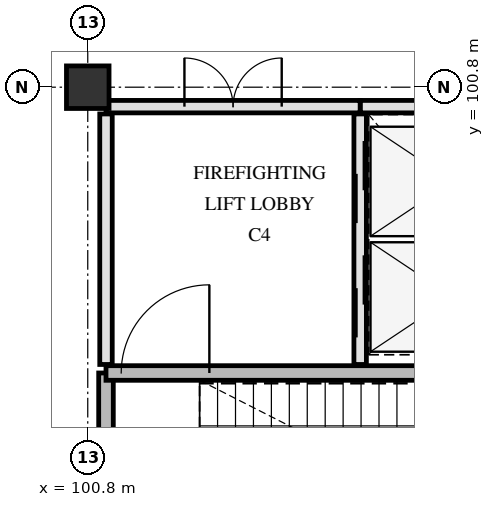
"""IFC4 building model, lengths in metres.
Left out: names, types, materials, properties, quantities, classifications, styles, units other than length and angle.
Written with IfcOpenShell. Run it as: python <this file> out.ifc"""

import sys

from ifc_helpers import new_model, si_unit, direction, frame, frame_2d, origin, origin_2d, place, context, subcontext, project, spatial, rectangle, extrude, element, fill, save


model = new_model("IFC4")
c1 = context("Model", 3, precision=1e-05, world=origin(), true_north=direction((0.0, 1.0)))
c2 = subcontext(c1, "Body", "Model", "MODEL_VIEW")
j1 = project(units=[si_unit("LENGTHUNIT", "METRE"), si_unit("PLANEANGLEUNIT", "RADIAN")], contexts=[c1])
p1 = place(None, origin())
s1 = spatial("IfcSite", under=j1, at=p1, CompositionType="ELEMENT")
p2 = place(p1, origin())
s2 = spatial("IfcBuilding", under=s1, at=p2, CompositionType="ELEMENT")
p3 = place(p2, frame((0.0, 0.0, 9.3)))
s3 = spatial("IfcBuildingStorey", under=s2, at=p3, CompositionType="ELEMENT", Elevation=9.3)
p4 = place(p3, frame((100.8, 100.8, 0.0), z_axis=(0.0, 0.0, 1.0), x_axis=(1.0, 0.0, 0.0)))
e1 = element("IfcColumn", 1, at=p4, inside=s3, PredefinedType="COLUMN", context=c2, shape_type="SweptSolid", body=[
    extrude(rectangle(XDim=0.7, YDim=0.7, at=origin_2d()), origin(), (0.0, 0.0, 1.0), 5.1),
])
p5 = place(p3, frame((101.1, 92.78, 0.0), z_axis=(0.0, 0.0, 1.0), x_axis=(0.0, 1.0, 0.0)))
e2 = element("IfcWall", 2, at=p5, inside=s3, PredefinedType="SHEAR", context=c2, shape_type="SweptSolid", body=[
    extrude(rectangle(XDim=3.32, YDim=0.24, at=frame_2d((1.66, 0.0))), origin(), (0.0, 0.0, 1.0), 4.78),
])
p6 = place(p3, frame((101.1, 96.1, 0.0), z_axis=(0.0, 0.0, 1.0), x_axis=(1.0, 0.0, 0.0)))
e3 = element("IfcWall", 3, at=p6, inside=s3, PredefinedType="SHEAR", context=c2, shape_type="SweptSolid", body=[
    extrude(rectangle(XDim=7.82, YDim=0.24, at=frame_2d((3.91, 0.0))), origin(), (0.0, 0.0, 1.0), 4.78),
])
p7 = place(p6, frame((0.25, 0.0, 0.0)))
e4 = element("IfcOpeningElement", 4, at=p7, cuts=e3, PredefinedType="OPENING", context=c2, shape_type="SweptSolid", body=[
    extrude(rectangle(XDim=1.45, YDim=2.2, at=frame_2d((0.725, 1.1))), frame((0.0, 0.13, 0.0), z_axis=(0.0, -1.0, 0.0), x_axis=(1.0, 0.0, 0.0)), (0.0, 0.0, 1.0), 0.26),
])
p8 = place(p3, frame((105.28, 96.24, 0.0), z_axis=(0.0, 0.0, 1.0), x_axis=(0.0, 1.0, 0.0)))
e5 = element("IfcWall", 5, at=p8, inside=s3, PredefinedType="PARTITIONING", context=c2, shape_type="SweptSolid", body=[
    extrude(rectangle(XDim=4.12, YDim=0.205, at=frame_2d((2.06, 0.0))), origin(), (0.0, 0.0, 1.0), 4.77),
])
p9 = place(p8, frame((0.445, 0.0, 0.0)))
e6 = element("IfcOpeningElement", 6, at=p9, cuts=e5, PredefinedType="OPENING", context=c2, shape_type="SweptSolid", body=[
    extrude(rectangle(XDim=1.35, YDim=2.2, at=frame_2d((0.675, 1.1))), frame((0.0, 0.113, 0.0), z_axis=(0.0, -1.0, 0.0), x_axis=(1.0, 0.0, 0.0)), (0.0, 0.0, 1.0), 0.225),
])
p10 = place(p8, frame((2.325, 0.0, 0.0)))
e7 = element("IfcOpeningElement", 7, at=p10, cuts=e5, PredefinedType="OPENING", context=c2, shape_type="SweptSolid", body=[
    extrude(rectangle(XDim=1.35, YDim=2.2, at=frame_2d((0.675, 1.1))), frame((0.0, 0.113, 0.0), z_axis=(0.0, -1.0, 0.0), x_axis=(1.0, 0.0, 0.0)), (0.0, 0.0, 1.0), 0.225),
])
p11 = place(p3, frame((105.28, 100.48, 0.0), z_axis=(0.0, 0.0, 1.0), x_axis=(1.0, 0.0, 0.0)))
e8 = element("IfcWall", 8, at=p11, inside=s3, PredefinedType="PARTITIONING", context=c2, shape_type="SweptSolid", body=[
    extrude(rectangle(XDim=3.57, YDim=0.205, at=frame_2d((1.785, 0.0))), origin(), (0.0, 0.0, 1.0), 4.17),
])
p12 = place(p3, frame((101.1, 96.24, 0.0), z_axis=(0.0, 0.0, 1.0), x_axis=(0.0, 1.0, 0.0)))
e9 = element("IfcWall", 9, at=p12, inside=s3, PredefinedType="PARTITIONING", context=c2, shape_type="SweptSolid", body=[
    extrude(rectangle(XDim=4.12, YDim=0.205, at=frame_2d((2.06, 0.0))), origin(), (0.0, 0.0, 1.0), 4.17),
])
p13 = place(p3, frame((101.1, 100.48, 0.0), z_axis=(0.0, 0.0, 1.0), x_axis=(1.0, 0.0, 0.0)))
e10 = element("IfcWall", 10, at=p13, inside=s3, PredefinedType="PARTITIONING", context=c2, shape_type="SweptSolid", body=[
    extrude(rectangle(XDim=4.18, YDim=0.205, at=frame_2d((2.09, 0.0))), origin(), (0.0, 0.0, 1.0), 4.17),
])
p14 = place(p13, frame((1.29, 0.0, 0.0)))
e11 = element("IfcOpeningElement", 11, at=p14, cuts=e10, PredefinedType="OPENING", context=c2, shape_type="SweptSolid", body=[
    extrude(rectangle(XDim=1.6, YDim=2.25, at=frame_2d((0.8, 1.125))), frame((0.0, 0.113, 0.0), z_axis=(0.0, -1.0, 0.0), x_axis=(1.0, 0.0, 0.0)), (0.0, 0.0, 1.0), 0.225),
])
p15 = place(p7, origin())
e12 = element("IfcDoor", 12, at=p15, inside=s3, OperationType="SINGLE_SWING_RIGHT", PredefinedType="DOOR", context=c2, shape_type="SweptSolid", body=[
    extrude(rectangle(XDim=1.45, YDim=2.2, at=frame_2d((0.725, 1.1))), frame((0.0, 0.025, 0.0), z_axis=(0.0, -1.0, 0.0), x_axis=(1.0, 0.0, 0.0)), (0.0, 0.0, 1.0), 0.05),
])
fill(e4, e12)
p16 = place(p9, origin())
e13 = element("IfcDoor", 13, at=p16, inside=s3, OperationType="SLIDING_TO_LEFT", PredefinedType="DOOR", context=c2, shape_type="SweptSolid", body=[
    extrude(rectangle(XDim=1.35, YDim=2.2, at=frame_2d((0.675, 1.1))), frame((0.0, 0.025, 0.0), z_axis=(0.0, -1.0, 0.0), x_axis=(1.0, 0.0, 0.0)), (0.0, 0.0, 1.0), 0.05),
])
fill(e6, e13)
p17 = place(p10, origin())
e14 = element("IfcDoor", 14, at=p17, inside=s3, OperationType="SLIDING_TO_LEFT", PredefinedType="DOOR", context=c2, shape_type="SweptSolid", body=[
    extrude(rectangle(XDim=1.35, YDim=2.2, at=frame_2d((0.675, 1.1))), frame((0.0, 0.025, 0.0), z_axis=(0.0, -1.0, 0.0), x_axis=(1.0, 0.0, 0.0)), (0.0, 0.0, 1.0), 0.05),
])
fill(e7, e14)
p18 = place(p14, origin())
e15 = element("IfcDoor", 15, at=p18, inside=s3, OperationType="DOUBLE_SWING_LEFT", PredefinedType="DOOR", context=c2, shape_type="SweptSolid", body=[
    extrude(rectangle(XDim=1.6, YDim=2.25, at=frame_2d((0.8, 1.125))), frame((0.0, 0.025, 0.0), z_axis=(0.0, -1.0, 0.0), x_axis=(1.0, 0.0, 0.0)), (0.0, 0.0, 1.0), 0.05),
])
fill(e11, e15)
save(model, sys.argv[1])
